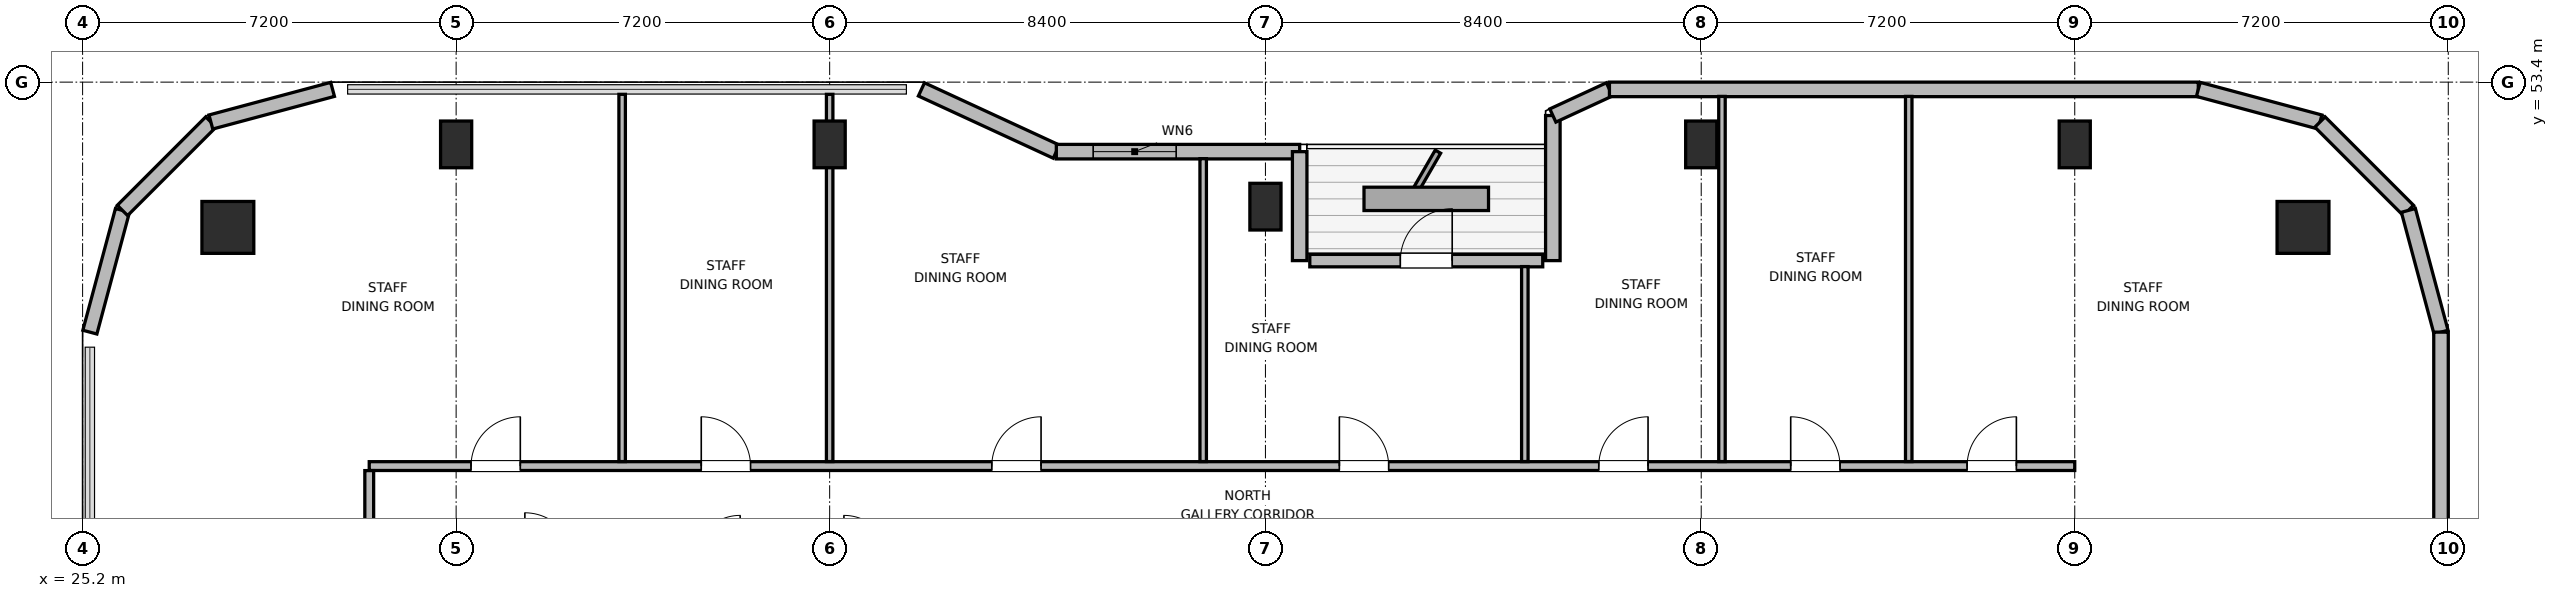
"""IFC4 building model, lengths in metres.
Left out: names, types, materials, properties, quantities, classifications, styles, units other than length and angle.
Written with IfcOpenShell. Run it as: python <this file> out.ifc"""

import sys

from ifc_helpers import new_model, si_unit, direction, frame, frame_2d, origin, origin_2d, place, context, subcontext, project, spatial, rectangle, circle, extrude, element, fill, save


model = new_model("IFC4")
c1 = context("Model", 3, precision=1e-05, world=origin(), true_north=direction((0.0, 1.0)))
c2 = subcontext(c1, "Body", "Model", "MODEL_VIEW")
j1 = project(units=[si_unit("LENGTHUNIT", "METRE"), si_unit("PLANEANGLEUNIT", "RADIAN")], contexts=[c1])
p1 = place(None, origin())
s1 = spatial("IfcSite", under=j1, at=p1, CompositionType="ELEMENT")
p2 = place(p1, origin())
s2 = spatial("IfcBuilding", under=s1, at=p2, CompositionType="ELEMENT")
p3 = place(p2, frame((0.0, 0.0, 302.4)))
s3 = spatial("IfcBuildingStorey", under=s2, at=p3, CompositionType="ELEMENT", Elevation=302.4)
for number, where, z_axis, x_axis in (
    (1, (68.0, 50.6, 0.0), (0.0, 0.0, 1.0), (1.0, 0.0, 0.0)),
    (2, (28.0, 50.6, 0.0), (0.0, 0.0, 1.0), (1.0, 0.0, 0.0)),
):
    element("IfcColumn", number, at=place(p3, frame(where, z_axis=z_axis, x_axis=x_axis)), inside=s3, PredefinedType="COLUMN", context=c2, shape_type="SweptSolid", body=[
        extrude(circle(Radius=0.5, at=origin_2d()), origin(), (0.0, 0.0, 1.0), 3.9),
    ])
for number, where, z_axis, x_axis in (
    (3, (32.4, 52.2, 0.0), (0.0, 0.0, 1.0), (1.0, 0.0, 0.0)),
    (4, (39.6, 52.2, 0.0), (0.0, 0.0, 1.0), (1.0, 0.0, 0.0)),
    (5, (48.0, 51.0, 0.0), (0.0, 0.0, 1.0), (1.0, 0.0, 0.0)),
    (6, (56.4, 52.2, 0.0), (0.0, 0.0, 1.0), (1.0, 0.0, 0.0)),
    (7, (63.6, 52.2, 0.0), (0.0, 0.0, 1.0), (1.0, 0.0, 0.0)),
):
    element("IfcColumn", number, at=place(p3, frame(where, z_axis=z_axis, x_axis=x_axis)), inside=s3, PredefinedType="COLUMN", context=c2, shape_type="SweptSolid", body=[
        extrude(rectangle(XDim=0.6, YDim=0.9, at=origin_2d()), origin(), (0.0, 0.0, 1.0), 3.9),
    ])
p4 = place(p3, frame((25.34, 48.582, 0.0), z_axis=(0.0, 0.0, 1.0), x_axis=(0.258751159445, 0.965944013639, 0.0)))
e8 = element("IfcWall", 8, at=p4, inside=s3, PredefinedType="SOLIDWALL", context=c2, shape_type="SweptSolid", body=[
    extrude(rectangle(XDim=2.429, YDim=0.28, at=frame_2d((1.214, 0.0))), origin(), (0.0, 0.0, 1.0), 3.68),
])
p5 = place(p3, frame((25.969, 50.927, 0.0), z_axis=(0.0, 0.0, 1.0), x_axis=(0.707106781187, 0.707106781187, 0.0)))
e9 = element("IfcWall", 9, at=p5, inside=s3, PredefinedType="SOLIDWALL", context=c2, shape_type="SweptSolid", body=[
    extrude(rectangle(XDim=2.41, YDim=0.28, at=frame_2d((1.205, 0.0))), origin(), (0.0, 0.0, 1.0), 3.68),
])
p6 = place(p3, frame((27.673, 52.632, 0.0), z_axis=(0.0, 0.0, 1.0), x_axis=(0.965937282298, 0.25877628691, 0.0)))
e10 = element("IfcWall", 10, at=p6, inside=s3, PredefinedType="SOLIDWALL", context=c2, shape_type="SweptSolid", body=[
    extrude(rectangle(XDim=2.428, YDim=0.28, at=frame_2d((1.214, 0.0))), origin(), (0.0, 0.0, 1.0), 3.68),
])
p7 = place(p3, frame((41.369, 53.26, 0.0), z_axis=(0.0, 0.0, 1.0), x_axis=(0.907956889006, -0.419063584324, 0.0)))
e11 = element("IfcWall", 11, at=p7, inside=s3, PredefinedType="SOLIDWALL", context=c2, shape_type="SweptSolid", body=[
    extrude(rectangle(XDim=2.864, YDim=0.28, at=frame_2d((1.432, 0.0))), origin(), (0.0, 0.0, 1.0), 2.265),
])
p8 = place(p3, frame((43.969, 52.06, 0.0), z_axis=(0.0, 0.0, 1.0), x_axis=(1.0, 0.0, 0.0)))
e12 = element("IfcWall", 12, at=p8, inside=s3, PredefinedType="SOLIDWALL", context=c2, shape_type="SweptSolid", body=[
    extrude(rectangle(XDim=4.691, YDim=0.28, at=frame_2d((2.345, 0.0))), origin(), (0.0, 0.0, 1.0), 2.265),
])
p9 = place(p8, frame((0.71, 0.0, 0.85)))
e13 = element("IfcOpeningElement", 13, at=p9, cuts=e12, PredefinedType="OPENING", context=c2, shape_type="SweptSolid", body=[
    extrude(rectangle(XDim=1.6, YDim=1.0, at=frame_2d((0.8, 0.5))), frame((0.0, 0.15, 0.0), z_axis=(0.0, -1.0, 0.0), x_axis=(1.0, 0.0, 0.0)), (0.0, 0.0, 1.0), 0.3),
])
p10 = place(p3, frame((48.66, 52.06, 0.0), z_axis=(0.0, 0.0, 1.0), x_axis=(0.0, -1.0, 0.0)))
e14 = element("IfcWall", 14, at=p10, inside=s3, PredefinedType="SOLIDWALL", context=c2, shape_type="SweptSolid", body=[
    extrude(rectangle(XDim=2.1, YDim=0.28, at=frame_2d((1.05, 0.0))), origin(), (0.0, 0.0, 1.0), 2.265),
])
p11 = place(p3, frame((48.855, 49.96, 0.0), z_axis=(0.0, 0.0, 1.0), x_axis=(1.0, 0.0, 0.0)))
e15 = element("IfcWall", 15, at=p11, inside=s3, PredefinedType="SOLIDWALL", context=c2, shape_type="SweptSolid", body=[
    extrude(rectangle(XDim=4.49, YDim=0.24, at=frame_2d((2.245, 0.0))), origin(), (0.0, 0.0, 1.0), 3.68),
])
p12 = place(p11, frame((1.745, 0.0, 0.0)))
e16 = element("IfcOpeningElement", 16, at=p12, cuts=e15, PredefinedType="OPENING", context=c2, shape_type="SweptSolid", body=[
    extrude(rectangle(XDim=1.0, YDim=2.02, at=frame_2d((0.5, 1.01))), frame((0.0, 0.13, 0.0), z_axis=(0.0, -1.0, 0.0), x_axis=(1.0, 0.0, 0.0)), (0.0, 0.0, 1.0), 0.26),
])
p13 = place(p3, frame((53.54, 49.96, 0.0), z_axis=(0.0, 0.0, 1.0), x_axis=(0.0, 1.0, 0.0)))
e17 = element("IfcWall", 17, at=p13, inside=s3, PredefinedType="SOLIDWALL", context=c2, shape_type="SweptSolid", body=[
    extrude(rectangle(XDim=2.796, YDim=0.28, at=frame_2d((1.398, 0.0))), origin(), (0.0, 0.0, 1.0), 2.265),
])
p14 = place(p3, frame((53.54, 52.756, 0.0), z_axis=(0.0, 0.0, 1.0), x_axis=(0.907893953211, 0.419199916176, 0.0)))
e18 = element("IfcWall", 18, at=p14, inside=s3, PredefinedType="SOLIDWALL", context=c2, shape_type="SweptSolid", body=[
    extrude(rectangle(XDim=1.201, YDim=0.28, at=frame_2d((0.601, 0.0))), origin(), (0.0, 0.0, 1.0), 3.68),
])
p15 = place(p3, frame((54.631, 53.26, 0.0), z_axis=(0.0, 0.0, 1.0), x_axis=(1.0, 0.0, 0.0)))
e19 = element("IfcWall", 19, at=p15, inside=s3, PredefinedType="SOLIDWALL", context=c2, shape_type="SweptSolid", body=[
    extrude(rectangle(XDim=11.351, YDim=0.28, at=frame_2d((5.675, 0.0))), origin(), (0.0, 0.0, 1.0), 3.68),
])
p16 = place(p3, frame((65.982, 53.26, 0.0), z_axis=(0.0, 0.0, 1.0), x_axis=(0.965937282298, -0.25877628691, 0.0)))
e20 = element("IfcWall", 20, at=p16, inside=s3, PredefinedType="SOLIDWALL", context=c2, shape_type="SweptSolid", body=[
    extrude(rectangle(XDim=2.428, YDim=0.28, at=frame_2d((1.214, 0.0))), origin(), (0.0, 0.0, 1.0), 3.68),
])
p17 = place(p3, frame((68.327, 52.632, 0.0), z_axis=(0.0, 0.0, 1.0), x_axis=(0.707106781187, -0.707106781187, 0.0)))
e21 = element("IfcWall", 21, at=p17, inside=s3, PredefinedType="SOLIDWALL", context=c2, shape_type="SweptSolid", body=[
    extrude(rectangle(XDim=2.41, YDim=0.28, at=frame_2d((1.205, 0.0))), origin(), (0.0, 0.0, 1.0), 3.68),
])
p18 = place(p3, frame((70.031, 50.927, 0.0), z_axis=(0.0, 0.0, 1.0), x_axis=(0.258751159445, -0.965944013639, 0.0)))
e22 = element("IfcWall", 22, at=p18, inside=s3, PredefinedType="SOLIDWALL", context=c2, shape_type="SweptSolid", body=[
    extrude(rectangle(XDim=2.429, YDim=0.28, at=frame_2d((1.214, 0.0))), origin(), (0.0, 0.0, 1.0), 3.68),
])
p19 = place(p3, frame((70.66, 48.582, 0.0), z_axis=(0.0, 0.0, 1.0), x_axis=(0.0, -1.0, 0.0)))
e23 = element("IfcWall", 23, at=p19, inside=s3, PredefinedType="SOLIDWALL", context=c2, shape_type="SweptSolid", body=[
    extrude(rectangle(XDim=5.842, YDim=0.28, at=frame_2d((2.921, 0.0))), origin(), (0.0, 0.0, 1.0), 3.68),
])
p20 = place(p3, frame((30.725, 46.0, 0.0), z_axis=(0.0, 0.0, 1.0), x_axis=(1.0, 0.0, 0.0)))
e24 = element("IfcWall", 24, at=p20, inside=s3, PredefinedType="PARTITIONING", context=c2, shape_type="SweptSolid", body=[
    extrude(rectangle(XDim=32.875, YDim=0.17, at=frame_2d((16.438, 0.0))), origin(), (0.0, 0.0, 1.0), 3.68),
])
p21 = place(p20, frame((1.962, 0.0, 0.0)))
e25 = element("IfcOpeningElement", 25, at=p21, cuts=e24, PredefinedType="OPENING", context=c2, shape_type="SweptSolid", body=[
    extrude(rectangle(XDim=0.95, YDim=2.04, at=frame_2d((0.475, 1.02))), frame((0.0, 0.095, 0.0), z_axis=(0.0, -1.0, 0.0), x_axis=(1.0, 0.0, 0.0)), (0.0, 0.0, 1.0), 0.19),
])
p22 = place(p20, frame((6.4, 0.0, 0.0)))
e26 = element("IfcOpeningElement", 26, at=p22, cuts=e24, PredefinedType="OPENING", context=c2, shape_type="SweptSolid", body=[
    extrude(rectangle(XDim=0.95, YDim=2.04, at=frame_2d((0.475, 1.02))), frame((0.0, 0.095, 0.0), z_axis=(0.0, -1.0, 0.0), x_axis=(1.0, 0.0, 0.0)), (0.0, 0.0, 1.0), 0.19),
])
p23 = place(p20, frame((12.0, 0.0, 0.0)))
e27 = element("IfcOpeningElement", 27, at=p23, cuts=e24, PredefinedType="OPENING", context=c2, shape_type="SweptSolid", body=[
    extrude(rectangle(XDim=0.95, YDim=2.04, at=frame_2d((0.475, 1.02))), frame((0.0, 0.095, 0.0), z_axis=(0.0, -1.0, 0.0), x_axis=(1.0, 0.0, 0.0)), (0.0, 0.0, 1.0), 0.19),
])
p24 = place(p20, frame((18.7, 0.0, 0.0)))
e28 = element("IfcOpeningElement", 28, at=p24, cuts=e24, PredefinedType="OPENING", context=c2, shape_type="SweptSolid", body=[
    extrude(rectangle(XDim=0.95, YDim=2.04, at=frame_2d((0.475, 1.02))), frame((0.0, 0.095, 0.0), z_axis=(0.0, -1.0, 0.0), x_axis=(1.0, 0.0, 0.0)), (0.0, 0.0, 1.0), 0.19),
])
p25 = place(p20, frame((23.7, 0.0, 0.0)))
e29 = element("IfcOpeningElement", 29, at=p25, cuts=e24, PredefinedType="OPENING", context=c2, shape_type="SweptSolid", body=[
    extrude(rectangle(XDim=0.95, YDim=2.04, at=frame_2d((0.475, 1.02))), frame((0.0, 0.095, 0.0), z_axis=(0.0, -1.0, 0.0), x_axis=(1.0, 0.0, 0.0)), (0.0, 0.0, 1.0), 0.19),
])
p26 = place(p20, frame((27.4, 0.0, 0.0)))
e30 = element("IfcOpeningElement", 30, at=p26, cuts=e24, PredefinedType="OPENING", context=c2, shape_type="SweptSolid", body=[
    extrude(rectangle(XDim=0.95, YDim=2.04, at=frame_2d((0.475, 1.02))), frame((0.0, 0.095, 0.0), z_axis=(0.0, -1.0, 0.0), x_axis=(1.0, 0.0, 0.0)), (0.0, 0.0, 1.0), 0.19),
])
p27 = place(p20, frame((30.8, 0.0, 0.0)))
e31 = element("IfcOpeningElement", 31, at=p27, cuts=e24, PredefinedType="OPENING", context=c2, shape_type="SweptSolid", body=[
    extrude(rectangle(XDim=0.95, YDim=2.04, at=frame_2d((0.475, 1.02))), frame((0.0, 0.095, 0.0), z_axis=(0.0, -1.0, 0.0), x_axis=(1.0, 0.0, 0.0)), (0.0, 0.0, 1.0), 0.19),
])
p28 = place(p3, frame((30.725, 26.087, 0.0), z_axis=(0.0, 0.0, 1.0), x_axis=(0.0, 1.0, 0.0)))
e32 = element("IfcWall", 32, at=p28, inside=s3, PredefinedType="PARTITIONING", context=c2, shape_type="SweptSolid", body=[
    extrude(rectangle(XDim=19.826, YDim=0.17, at=frame_2d((9.913, 0.0))), origin(), (0.0, 0.0, 1.0), 3.68),
])
p29 = place(p28, frame((3.138, 0.0, 0.0)))
e33 = element("IfcOpeningElement", 33, at=p29, cuts=e32, PredefinedType="OPENING", context=c2, shape_type="SweptSolid", body=[
    extrude(rectangle(XDim=0.95, YDim=2.04, at=frame_2d((0.475, 1.02))), frame((0.0, 0.095, 0.0), z_axis=(0.0, -1.0, 0.0), x_axis=(1.0, 0.0, 0.0)), (0.0, 0.0, 1.0), 0.19),
])
p30 = place(p28, frame((10.038, 0.0, 0.0)))
e34 = element("IfcOpeningElement", 34, at=p30, cuts=e32, PredefinedType="OPENING", context=c2, shape_type="SweptSolid", body=[
    extrude(rectangle(XDim=0.95, YDim=2.04, at=frame_2d((0.475, 1.02))), frame((0.0, 0.095, 0.0), z_axis=(0.0, -1.0, 0.0), x_axis=(1.0, 0.0, 0.0)), (0.0, 0.0, 1.0), 0.19),
])
p31 = place(p28, frame((16.338, 0.0, 0.0)))
e35 = element("IfcOpeningElement", 35, at=p31, cuts=e32, PredefinedType="OPENING", context=c2, shape_type="SweptSolid", body=[
    extrude(rectangle(XDim=0.95, YDim=2.04, at=frame_2d((0.475, 1.02))), frame((0.0, 0.095, 0.0), z_axis=(0.0, -1.0, 0.0), x_axis=(1.0, 0.0, 0.0)), (0.0, 0.0, 1.0), 0.19),
])
p32 = place(p3, frame((35.6, 46.087, 0.0), z_axis=(0.0, 0.0, 1.0), x_axis=(0.0, 1.0, 0.0)))
e36 = element("IfcWall", 36, at=p32, inside=s3, PredefinedType="PARTITIONING", context=c2, shape_type="SweptSolid", body=[
    extrude(rectangle(XDim=7.078, YDim=0.125, at=frame_2d((3.539, 0.0))), origin(), (0.0, 0.0, 1.0), 3.68),
])
p33 = place(p3, frame((39.6, 46.087, 0.0), z_axis=(0.0, 0.0, 1.0), x_axis=(0.0, 1.0, 0.0)))
e37 = element("IfcWall", 37, at=p33, inside=s3, PredefinedType="PARTITIONING", context=c2, shape_type="SweptSolid", body=[
    extrude(rectangle(XDim=7.078, YDim=0.125, at=frame_2d((3.539, 0.0))), origin(), (0.0, 0.0, 1.0), 3.043),
])
p34 = place(p3, frame((46.8, 46.087, 0.0), z_axis=(0.0, 0.0, 1.0), x_axis=(0.0, 1.0, 0.0)))
e38 = element("IfcWall", 38, at=p34, inside=s3, PredefinedType="PARTITIONING", context=c2, shape_type="SweptSolid", body=[
    extrude(rectangle(XDim=5.838, YDim=0.125, at=frame_2d((2.919, 0.0))), origin(), (0.0, 0.0, 1.0), 3.68),
])
p35 = place(p3, frame((53.0, 46.087, 0.0), z_axis=(0.0, 0.0, 1.0), x_axis=(0.0, 1.0, 0.0)))
e39 = element("IfcWall", 39, at=p35, inside=s3, PredefinedType="PARTITIONING", context=c2, shape_type="SweptSolid", body=[
    extrude(rectangle(XDim=3.758, YDim=0.125, at=frame_2d((1.879, 0.0))), origin(), (0.0, 0.0, 1.0), 3.043),
])
for number, where, z_axis, x_axis in (
    (40, (56.8, 46.087, 0.0), (0.0, 0.0, 1.0), (0.0, 1.0, 0.0)),
    (41, (60.4, 46.087, 0.0), (0.0, 0.0, 1.0), (0.0, 1.0, 0.0)),
):
    element("IfcWall", number, at=place(p3, frame(where, z_axis=z_axis, x_axis=x_axis)), inside=s3, PredefinedType="PARTITIONING", context=c2, shape_type="SweptSolid", body=[
        extrude(rectangle(XDim=7.038, YDim=0.125, at=frame_2d((3.519, 0.0))), origin(), (0.0, 0.0, 1.0), 3.68),
    ])
p36 = place(p9, origin())
e42 = element("IfcWindow", 42, at=p36, inside=s3, PartitioningType="SINGLE_PANEL", PredefinedType="WINDOW", context=c2, shape_type="SweptSolid", body=[
    extrude(rectangle(XDim=1.6, YDim=1.0, at=frame_2d((0.8, 0.5))), frame((0.0, 0.03, 0.0), z_axis=(0.0, -1.0, 0.0), x_axis=(1.0, 0.0, 0.0)), (0.0, 0.0, 1.0), 0.06),
])
fill(e13, e42)
p37 = place(p12, origin())
e43 = element("IfcDoor", 43, at=p37, inside=s3, OperationType="SINGLE_SWING_RIGHT", PredefinedType="DOOR", context=c2, shape_type="SweptSolid", body=[
    extrude(rectangle(XDim=1.0, YDim=2.02, at=frame_2d((0.5, 1.01))), frame((0.0, 0.025, 0.0), z_axis=(0.0, -1.0, 0.0), x_axis=(1.0, 0.0, 0.0)), (0.0, 0.0, 1.0), 0.05),
])
fill(e16, e43)
p38 = place(p21, origin())
e44 = element("IfcDoor", 44, at=p38, inside=s3, OperationType="SINGLE_SWING_RIGHT", PredefinedType="DOOR", context=c2, shape_type="SweptSolid", body=[
    extrude(rectangle(XDim=0.95, YDim=2.04, at=frame_2d((0.475, 1.02))), frame((0.0, 0.025, 0.0), z_axis=(0.0, -1.0, 0.0), x_axis=(1.0, 0.0, 0.0)), (0.0, 0.0, 1.0), 0.05),
])
fill(e25, e44)
p39 = place(p22, origin())
e45 = element("IfcDoor", 45, at=p39, inside=s3, OperationType="SINGLE_SWING_LEFT", PredefinedType="DOOR", context=c2, shape_type="SweptSolid", body=[
    extrude(rectangle(XDim=0.95, YDim=2.04, at=frame_2d((0.475, 1.02))), frame((0.0, 0.025, 0.0), z_axis=(0.0, -1.0, 0.0), x_axis=(1.0, 0.0, 0.0)), (0.0, 0.0, 1.0), 0.05),
])
fill(e26, e45)
p40 = place(p23, origin())
e46 = element("IfcDoor", 46, at=p40, inside=s3, OperationType="SINGLE_SWING_RIGHT", PredefinedType="DOOR", context=c2, shape_type="SweptSolid", body=[
    extrude(rectangle(XDim=0.95, YDim=2.04, at=frame_2d((0.475, 1.02))), frame((0.0, 0.025, 0.0), z_axis=(0.0, -1.0, 0.0), x_axis=(1.0, 0.0, 0.0)), (0.0, 0.0, 1.0), 0.05),
])
fill(e27, e46)
p41 = place(p24, origin())
e47 = element("IfcDoor", 47, at=p41, inside=s3, OperationType="SINGLE_SWING_LEFT", PredefinedType="DOOR", context=c2, shape_type="SweptSolid", body=[
    extrude(rectangle(XDim=0.95, YDim=2.04, at=frame_2d((0.475, 1.02))), frame((0.0, 0.025, 0.0), z_axis=(0.0, -1.0, 0.0), x_axis=(1.0, 0.0, 0.0)), (0.0, 0.0, 1.0), 0.05),
])
fill(e28, e47)
p42 = place(p25, origin())
e48 = element("IfcDoor", 48, at=p42, inside=s3, OperationType="SINGLE_SWING_RIGHT", PredefinedType="DOOR", context=c2, shape_type="SweptSolid", body=[
    extrude(rectangle(XDim=0.95, YDim=2.04, at=frame_2d((0.475, 1.02))), frame((0.0, 0.025, 0.0), z_axis=(0.0, -1.0, 0.0), x_axis=(1.0, 0.0, 0.0)), (0.0, 0.0, 1.0), 0.05),
])
fill(e29, e48)
p43 = place(p26, origin())
e49 = element("IfcDoor", 49, at=p43, inside=s3, OperationType="SINGLE_SWING_LEFT", PredefinedType="DOOR", context=c2, shape_type="SweptSolid", body=[
    extrude(rectangle(XDim=0.95, YDim=2.04, at=frame_2d((0.475, 1.02))), frame((0.0, 0.025, 0.0), z_axis=(0.0, -1.0, 0.0), x_axis=(1.0, 0.0, 0.0)), (0.0, 0.0, 1.0), 0.05),
])
fill(e30, e49)
p44 = place(p27, origin())
e50 = element("IfcDoor", 50, at=p44, inside=s3, OperationType="SINGLE_SWING_RIGHT", PredefinedType="DOOR", context=c2, shape_type="SweptSolid", body=[
    extrude(rectangle(XDim=0.95, YDim=2.04, at=frame_2d((0.475, 1.02))), frame((0.0, 0.025, 0.0), z_axis=(0.0, -1.0, 0.0), x_axis=(1.0, 0.0, 0.0)), (0.0, 0.0, 1.0), 0.05),
])
fill(e31, e50)
save(model, sys.argv[1])
